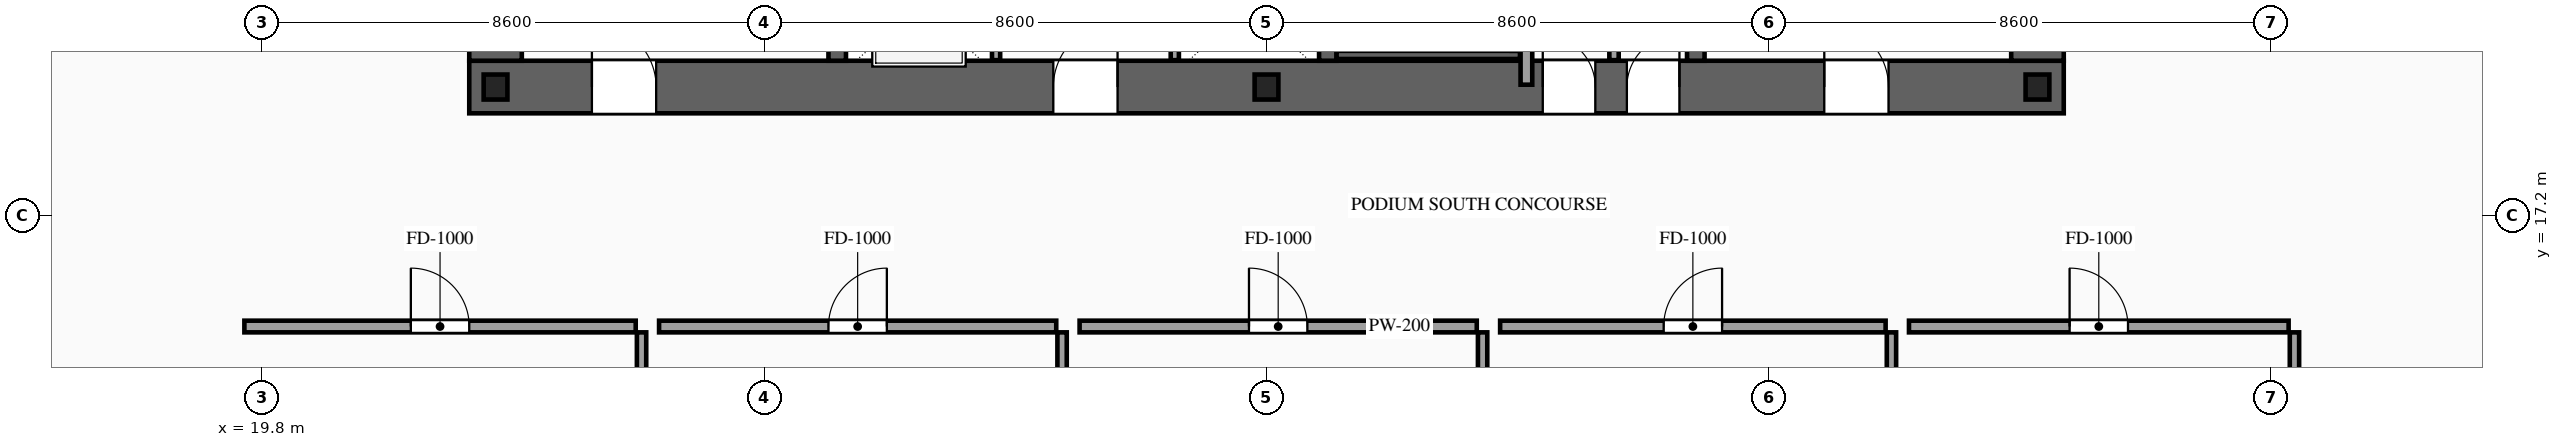
"""IFC4 building model, lengths in metres.
Left out: names, types, materials, properties, quantities, classifications, styles, units other than length and angle.
Written with IfcOpenShell. Run it as: python <this file> out.ifc"""

import sys

from ifc_helpers import new_model, si_unit, direction, frame, frame_2d, origin, origin_2d, place, context, subcontext, project, spatial, rectangle, i_section, extrude, source, transform, mapped, element, fill, save


model = new_model("IFC4")
c1 = context("Model", 3, precision=1e-05, world=origin(), true_north=direction((0.0, 1.0)))
c2 = subcontext(c1, "Body", "Model", "MODEL_VIEW")
j1 = project(units=[si_unit("LENGTHUNIT", "METRE"), si_unit("PLANEANGLEUNIT", "RADIAN")], contexts=[c1])
p1 = place(None, origin())
s1 = spatial("IfcSite", under=j1, at=p1, CompositionType="ELEMENT")
p2 = place(p1, origin())
s2 = spatial("IfcBuilding", under=s1, at=p2, CompositionType="ELEMENT")
p3 = place(p2, frame((0.0, 0.0, 15.0)))
s3 = spatial("IfcBuildingStorey", under=s2, at=p3, CompositionType="ELEMENT", Elevation=15.0)
p4 = place(p3, frame((23.35, 19.4, 0.0), z_axis=(0.0, 0.0, 1.0), x_axis=(1.0, 0.0, 0.0)))
e1 = element("IfcWall", 1, at=p4, inside=s3, PredefinedType="SHEAR", context=c2, shape_type="SweptSolid", body=[
    extrude(rectangle(XDim=27.3, YDim=0.9, at=frame_2d((13.65, 0.0))), origin(), (0.0, 0.0, 1.0), 4.8),
])
p5 = place(p4, frame((2.1, 0.0, 0.0)))
e2 = element("IfcOpeningElement", 2, at=p5, cuts=e1, PredefinedType="OPENING", context=c2, shape_type="SweptSolid", body=[
    extrude(rectangle(XDim=1.1, YDim=2.2, at=frame_2d((0.55, 1.1))), frame((0.0, 0.465, 0.0), z_axis=(0.0, -1.0, 0.0), x_axis=(1.0, 0.0, 0.0)), (0.0, 0.0, 1.0), 0.93),
])
p6 = place(p4, frame((10.0, 0.0, 0.0)))
e3 = element("IfcOpeningElement", 3, at=p6, cuts=e1, PredefinedType="OPENING", context=c2, shape_type="SweptSolid", body=[
    extrude(rectangle(XDim=1.1, YDim=2.2, at=frame_2d((0.55, 1.1))), frame((0.0, 0.465, 0.0), z_axis=(0.0, -1.0, 0.0), x_axis=(1.0, 0.0, 0.0)), (0.0, 0.0, 1.0), 0.93),
])
p7 = place(p4, frame((23.2, 0.0, 0.0)))
e4 = element("IfcOpeningElement", 4, at=p7, cuts=e1, PredefinedType="OPENING", context=c2, shape_type="SweptSolid", body=[
    extrude(rectangle(XDim=1.1, YDim=2.2, at=frame_2d((0.55, 1.1))), frame((0.0, 0.465, 0.0), z_axis=(0.0, -1.0, 0.0), x_axis=(1.0, 0.0, 0.0)), (0.0, 0.0, 1.0), 0.93),
])
p8 = place(p4, frame((19.82, 0.0, 0.0)))
e5 = element("IfcOpeningElement", 5, at=p8, cuts=e1, PredefinedType="OPENING", context=c2, shape_type="SweptSolid", body=[
    extrude(rectangle(XDim=0.9, YDim=2.15, at=frame_2d((0.45, 1.075))), frame((0.0, 0.465, 0.0), z_axis=(0.0, -1.0, 0.0), x_axis=(1.0, 0.0, 0.0)), (0.0, 0.0, 1.0), 0.93),
])
p9 = place(p4, frame((18.38, 0.0, 0.0)))
e6 = element("IfcOpeningElement", 6, at=p9, cuts=e1, PredefinedType="OPENING", context=c2, shape_type="SweptSolid", body=[
    extrude(rectangle(XDim=0.9, YDim=2.15, at=frame_2d((0.45, 1.075))), frame((0.0, 0.465, 0.0), z_axis=(0.0, -1.0, 0.0), x_axis=(1.0, 0.0, 0.0)), (0.0, 0.0, 1.0), 0.93),
])
m1 = source(origin(), c2, "Body", "SweptSolid", [
    extrude(rectangle(XDim=11.9, YDim=0.9, at=frame_2d((5.95, 0.0))), origin(), (0.0, 0.0, 1.0), 4.8),
])
for number, where, z_axis, x_axis in (
    (7, (23.8, 19.85, 0.0), (0.0, 0.0, 1.0), (0.0, 1.0, 0.0)),
    (8, (50.2, 19.85, 0.0), (0.0, 0.0, 1.0), (0.0, 1.0, 0.0)),
):
    element("IfcWall", number, at=place(p3, frame(where, z_axis=z_axis, x_axis=x_axis)), inside=s3, PredefinedType="SHEAR", context=c2, shape_type="MappedRepresentation", body=[
        mapped(m1, transform((0.0, 0.0, 0.0), scale=1.0)),
    ])
m2 = source(origin(), c2, "Body", "SweptSolid", [
    extrude(rectangle(XDim=11.9, YDim=0.3, at=frame_2d((5.95, 0.0))), origin(), (0.0, 0.0, 1.0), 4.8),
])
for number, where, z_axis, x_axis in (
    (9, (29.65, 19.85, 0.0), (0.0, 0.0, 1.0), (0.0, 1.0, 0.0)),
    (10, (38.05, 19.85, 0.0), (0.0, 0.0, 1.0), (0.0, 1.0, 0.0)),
    (11, (44.35, 19.85, 0.0), (0.0, 0.0, 1.0), (0.0, 1.0, 0.0)),
):
    element("IfcWall", number, at=place(p3, frame(where, z_axis=z_axis, x_axis=x_axis)), inside=s3, PredefinedType="SOLIDWALL", context=c2, shape_type="MappedRepresentation", body=[
        mapped(m2, transform((0.0, 0.0, 0.0), scale=1.0)),
    ])
m3 = source(origin(), c2, "Body", "SweptSolid", [
    extrude(i_section(OverallWidth=0.407, OverallDepth=0.428, WebThickness=0.02, FlangeThickness=0.035, at=origin_2d()), origin(), (0.0, 0.0, 1.0), 4.8),
])
for number, where, z_axis, x_axis in (
    (12, (23.8, 19.4, 0.0), (0.0, 0.0, 1.0), (1.0, 0.0, 0.0)),
    (13, (37.0, 19.4, 0.0), (0.0, 0.0, 1.0), (1.0, 0.0, 0.0)),
    (14, (50.2, 19.4, 0.0), (0.0, 0.0, 1.0), (1.0, 0.0, 0.0)),
):
    element("IfcColumn", number, at=place(p3, frame(where, z_axis=z_axis, x_axis=x_axis)), inside=s3, PredefinedType="COLUMN", context=c2, shape_type="MappedRepresentation", body=[
        mapped(m3, transform((0.0, 0.0, 0.0), scale=1.0)),
    ])
p10 = place(p3, frame((32.37, 19.86, 0.0), z_axis=(0.0, 0.0, 1.0), x_axis=(0.0, 1.0, 0.0)))
e15 = element("IfcWall", 15, at=p10, inside=s3, PredefinedType="SOLIDWALL", context=c2, shape_type="SweptSolid", body=[
    extrude(rectangle(XDim=2.04, YDim=0.14, at=frame_2d((1.02, 0.0))), origin(), (0.0, 0.0, 1.0), 4.52),
])
p11 = place(p10, frame((0.47, 0.0, 0.0)))
e16 = element("IfcOpeningElement", 16, at=p11, cuts=e15, PredefinedType="OPENING", context=c2, shape_type="SweptSolid", body=[
    extrude(rectangle(XDim=1.1, YDim=2.2, at=frame_2d((0.55, 1.1))), frame((0.0, 0.085, 0.0), z_axis=(0.0, -1.0, 0.0), x_axis=(1.0, 0.0, 0.0)), (0.0, 0.0, 1.0), 0.17),
])
m4 = source(origin(), c2, "Body", "SweptSolid", [
    extrude(rectangle(XDim=2.04, YDim=0.14, at=frame_2d((1.02, 0.0))), origin(), (0.0, 0.0, 1.0), 4.52),
])
p12 = place(p3, frame((35.43, 19.86, 0.0), z_axis=(0.0, 0.0, 1.0), x_axis=(0.0, 1.0, 0.0)))
e17 = element("IfcWall", 17, at=p12, inside=s3, PredefinedType="SOLIDWALL", context=c2, shape_type="MappedRepresentation", body=[
    mapped(m4, transform((0.0, 0.0, 0.0), scale=1.0)),
])
m5 = source(origin(), c2, "Body", "SweptSolid", [
    extrude(rectangle(XDim=3.14, YDim=0.14, at=frame_2d((1.57, 0.0))), origin(), (0.0, 0.0, 1.0), 4.52),
])
p13 = place(p3, frame((38.2, 19.95, 0.0), z_axis=(0.0, 0.0, 1.0), x_axis=(1.0, 0.0, 0.0)))
e18 = element("IfcWall", 18, at=p13, inside=s3, PredefinedType="SOLIDWALL", context=c2, shape_type="MappedRepresentation", body=[
    mapped(m5, transform((0.0, 0.0, 0.0), scale=1.0)),
])
m6 = source(origin(), c2, "Body", "SweptSolid", [
    extrude(rectangle(XDim=1.34, YDim=0.16, at=frame_2d((0.67, 0.0))), origin(), (0.0, 0.0, 1.0), 4.52),
])
p14 = place(p3, frame((42.95, 19.86, 0.0), z_axis=(0.0, 0.0, 1.0), x_axis=(0.0, 1.0, 0.0)))
e19 = element("IfcWall", 19, at=p14, inside=s3, PredefinedType="PARTITIONING", context=c2, shape_type="MappedRepresentation", body=[
    mapped(m6, transform((0.0, 0.0, 0.0), scale=1.0)),
])
m7 = source(origin(), c2, "Body", "SweptSolid", [
    extrude(rectangle(XDim=6.51, YDim=0.2, at=frame_2d((3.255, 0.0))), origin(), (0.0, 0.0, 1.0), 4.52),
])
p15 = place(p3, frame((41.45, 19.44, 0.0), z_axis=(0.0, 0.0, 1.0), x_axis=(0.0, 1.0, 0.0)))
e20 = element("IfcWall", 20, at=p15, inside=s3, PredefinedType="PARTITIONING", context=c2, shape_type="MappedRepresentation", body=[
    mapped(m7, transform((0.0, 0.0, 0.0), scale=1.0)),
])
p16 = place(p3, frame((19.5, 15.3, 0.0), z_axis=(0.0, 0.0, 1.0), x_axis=(1.0, 0.0, 0.0)))
e21 = element("IfcWall", 21, at=p16, inside=s3, PredefinedType="PARTITIONING", context=c2, shape_type="SweptSolid", body=[
    extrude(rectangle(XDim=6.7, YDim=0.2, at=frame_2d((3.35, 0.0))), origin(), (0.0, 0.0, 1.0), 4.52),
])
p17 = place(p16, frame((2.85, 0.0, 0.0)))
e22 = element("IfcOpeningElement", 22, at=p17, cuts=e21, PredefinedType="OPENING", context=c2, shape_type="SweptSolid", body=[
    extrude(rectangle(XDim=1.0, YDim=2.2, at=frame_2d((0.5, 1.1))), frame((0.0, 0.115, 0.0), z_axis=(0.0, -1.0, 0.0), x_axis=(1.0, 0.0, 0.0)), (0.0, 0.0, 1.0), 0.23),
])
m8 = source(origin(), c2, "Body", "SweptSolid", [
    extrude(rectangle(XDim=13.22, YDim=0.16, at=frame_2d((6.61, 0.0))), origin(), (0.0, 0.0, 1.0), 4.52),
])
p18 = place(p3, frame((26.3, 1.98, 0.0), z_axis=(0.0, 0.0, 1.0), x_axis=(0.0, 1.0, 0.0)))
e23 = element("IfcWall", 23, at=p18, inside=s3, PredefinedType="PARTITIONING", context=c2, shape_type="MappedRepresentation", body=[
    mapped(m8, transform((0.0, 0.0, 0.0), scale=1.0)),
])
p19 = place(p3, frame((26.6, 15.3, 0.0), z_axis=(0.0, 0.0, 1.0), x_axis=(1.0, 0.0, 0.0)))
e24 = element("IfcWall", 24, at=p19, inside=s3, PredefinedType="PARTITIONING", context=c2, shape_type="SweptSolid", body=[
    extrude(rectangle(XDim=6.8, YDim=0.2, at=frame_2d((3.4, 0.0))), origin(), (0.0, 0.0, 1.0), 4.52),
])
p20 = place(p19, frame((2.9, 0.0, 0.0)))
e25 = element("IfcOpeningElement", 25, at=p20, cuts=e24, PredefinedType="OPENING", context=c2, shape_type="SweptSolid", body=[
    extrude(rectangle(XDim=1.0, YDim=2.2, at=frame_2d((0.5, 1.1))), frame((0.0, 0.115, 0.0), z_axis=(0.0, -1.0, 0.0), x_axis=(1.0, 0.0, 0.0)), (0.0, 0.0, 1.0), 0.23),
])
p21 = place(p3, frame((33.5, 1.98, 0.0), z_axis=(0.0, 0.0, 1.0), x_axis=(0.0, 1.0, 0.0)))
e26 = element("IfcWall", 26, at=p21, inside=s3, PredefinedType="PARTITIONING", context=c2, shape_type="MappedRepresentation", body=[
    mapped(m8, transform((0.0, 0.0, 0.0), scale=1.0)),
])
p22 = place(p3, frame((33.8, 15.3, 0.0), z_axis=(0.0, 0.0, 1.0), x_axis=(1.0, 0.0, 0.0)))
e27 = element("IfcWall", 27, at=p22, inside=s3, PredefinedType="PARTITIONING", context=c2, shape_type="SweptSolid", body=[
    extrude(rectangle(XDim=6.8, YDim=0.2, at=frame_2d((3.4, 0.0))), origin(), (0.0, 0.0, 1.0), 4.52),
])
p23 = place(p22, frame((2.9, 0.0, 0.0)))
e28 = element("IfcOpeningElement", 28, at=p23, cuts=e27, PredefinedType="OPENING", context=c2, shape_type="SweptSolid", body=[
    extrude(rectangle(XDim=1.0, YDim=2.2, at=frame_2d((0.5, 1.1))), frame((0.0, 0.115, 0.0), z_axis=(0.0, -1.0, 0.0), x_axis=(1.0, 0.0, 0.0)), (0.0, 0.0, 1.0), 0.23),
])
p24 = place(p3, frame((40.7, 1.98, 0.0), z_axis=(0.0, 0.0, 1.0), x_axis=(0.0, 1.0, 0.0)))
e29 = element("IfcWall", 29, at=p24, inside=s3, PredefinedType="PARTITIONING", context=c2, shape_type="MappedRepresentation", body=[
    mapped(m8, transform((0.0, 0.0, 0.0), scale=1.0)),
])
p25 = place(p3, frame((41.0, 15.3, 0.0), z_axis=(0.0, 0.0, 1.0), x_axis=(1.0, 0.0, 0.0)))
e30 = element("IfcWall", 30, at=p25, inside=s3, PredefinedType="PARTITIONING", context=c2, shape_type="SweptSolid", body=[
    extrude(rectangle(XDim=6.6, YDim=0.2, at=frame_2d((3.3, 0.0))), origin(), (0.0, 0.0, 1.0), 4.52),
])
p26 = place(p25, frame((2.8, 0.0, 0.0)))
e31 = element("IfcOpeningElement", 31, at=p26, cuts=e30, PredefinedType="OPENING", context=c2, shape_type="SweptSolid", body=[
    extrude(rectangle(XDim=1.0, YDim=2.2, at=frame_2d((0.5, 1.1))), frame((0.0, 0.115, 0.0), z_axis=(0.0, -1.0, 0.0), x_axis=(1.0, 0.0, 0.0)), (0.0, 0.0, 1.0), 0.23),
])
p27 = place(p3, frame((47.7, 1.98, 0.0), z_axis=(0.0, 0.0, 1.0), x_axis=(0.0, 1.0, 0.0)))
e32 = element("IfcWall", 32, at=p27, inside=s3, PredefinedType="PARTITIONING", context=c2, shape_type="MappedRepresentation", body=[
    mapped(m8, transform((0.0, 0.0, 0.0), scale=1.0)),
])
p28 = place(p3, frame((48.0, 15.3, 0.0), z_axis=(0.0, 0.0, 1.0), x_axis=(1.0, 0.0, 0.0)))
e33 = element("IfcWall", 33, at=p28, inside=s3, PredefinedType="PARTITIONING", context=c2, shape_type="SweptSolid", body=[
    extrude(rectangle(XDim=6.5, YDim=0.2, at=frame_2d((3.25, 0.0))), origin(), (0.0, 0.0, 1.0), 4.52),
])
p29 = place(p28, frame((2.75, 0.0, 0.0)))
e34 = element("IfcOpeningElement", 34, at=p29, cuts=e33, PredefinedType="OPENING", context=c2, shape_type="SweptSolid", body=[
    extrude(rectangle(XDim=1.0, YDim=2.2, at=frame_2d((0.5, 1.1))), frame((0.0, 0.115, 0.0), z_axis=(0.0, -1.0, 0.0), x_axis=(1.0, 0.0, 0.0)), (0.0, 0.0, 1.0), 0.23),
])
p30 = place(p3, frame((54.6, 1.98, 0.0), z_axis=(0.0, 0.0, 1.0), x_axis=(0.0, 1.0, 0.0)))
e35 = element("IfcWall", 35, at=p30, inside=s3, PredefinedType="PARTITIONING", context=c2, shape_type="MappedRepresentation", body=[
    mapped(m8, transform((0.0, 0.0, 0.0), scale=1.0)),
])
m9 = source(origin(), c2, "Body", "SweptSolid", [
    extrude(rectangle(XDim=1.1, YDim=2.2, at=frame_2d((0.55, 1.1))), frame((0.0, 0.025, 0.0), z_axis=(0.0, -1.0, 0.0), x_axis=(1.0, 0.0, 0.0)), (0.0, 0.0, 1.0), 0.05),
])
p31 = place(p5, origin())
e36 = element("IfcDoor", 36, at=p31, inside=s3, OperationType="SINGLE_SWING_LEFT", PredefinedType="DOOR", context=c2, shape_type="MappedRepresentation", body=[
    mapped(m9, transform((0.0, 0.0, 0.0), scale=1.0)),
])
fill(e2, e36)
p32 = place(p6, origin())
e37 = element("IfcDoor", 37, at=p32, inside=s3, OperationType="SINGLE_SWING_RIGHT", PredefinedType="DOOR", context=c2, shape_type="MappedRepresentation", body=[
    mapped(m9, transform((0.0, 0.0, 0.0), scale=1.0)),
])
fill(e3, e37)
p33 = place(p7, origin())
e38 = element("IfcDoor", 38, at=p33, inside=s3, OperationType="SINGLE_SWING_LEFT", PredefinedType="DOOR", context=c2, shape_type="MappedRepresentation", body=[
    mapped(m9, transform((0.0, 0.0, 0.0), scale=1.0)),
])
fill(e4, e38)
m10 = source(origin(), c2, "Body", "SweptSolid", [
    extrude(rectangle(XDim=0.9, YDim=2.15, at=frame_2d((0.45, 1.075))), frame((0.0, 0.025, 0.0), z_axis=(0.0, -1.0, 0.0), x_axis=(1.0, 0.0, 0.0)), (0.0, 0.0, 1.0), 0.05),
])
p34 = place(p8, origin())
e39 = element("IfcDoor", 39, at=p34, inside=s3, OperationType="SINGLE_SWING_RIGHT", PredefinedType="DOOR", context=c2, shape_type="MappedRepresentation", body=[
    mapped(m10, transform((0.0, 0.0, 0.0), scale=1.0)),
])
fill(e5, e39)
p35 = place(p9, origin())
e40 = element("IfcDoor", 40, at=p35, inside=s3, OperationType="SINGLE_SWING_LEFT", PredefinedType="DOOR", context=c2, shape_type="MappedRepresentation", body=[
    mapped(m10, transform((0.0, 0.0, 0.0), scale=1.0)),
])
fill(e6, e40)
m11 = source(origin(), c2, "Body", "SweptSolid", [
    extrude(rectangle(XDim=1.0, YDim=2.2, at=frame_2d((0.5, 1.1))), frame((0.0, 0.025, 0.0), z_axis=(0.0, -1.0, 0.0), x_axis=(1.0, 0.0, 0.0)), (0.0, 0.0, 1.0), 0.05),
])
p36 = place(p17, origin())
e41 = element("IfcDoor", 41, at=p36, inside=s3, OperationType="SINGLE_SWING_LEFT", PredefinedType="DOOR", context=c2, shape_type="MappedRepresentation", body=[
    mapped(m11, transform((0.0, 0.0, 0.0), scale=1.0)),
])
fill(e22, e41)
p37 = place(p20, origin())
e42 = element("IfcDoor", 42, at=p37, inside=s3, OperationType="SINGLE_SWING_RIGHT", PredefinedType="DOOR", context=c2, shape_type="MappedRepresentation", body=[
    mapped(m11, transform((0.0, 0.0, 0.0), scale=1.0)),
])
fill(e25, e42)
p38 = place(p23, origin())
e43 = element("IfcDoor", 43, at=p38, inside=s3, OperationType="SINGLE_SWING_LEFT", PredefinedType="DOOR", context=c2, shape_type="MappedRepresentation", body=[
    mapped(m11, transform((0.0, 0.0, 0.0), scale=1.0)),
])
fill(e28, e43)
p39 = place(p26, origin())
e44 = element("IfcDoor", 44, at=p39, inside=s3, OperationType="SINGLE_SWING_RIGHT", PredefinedType="DOOR", context=c2, shape_type="MappedRepresentation", body=[
    mapped(m11, transform((0.0, 0.0, 0.0), scale=1.0)),
])
fill(e31, e44)
p40 = place(p29, origin())
e45 = element("IfcDoor", 45, at=p40, inside=s3, OperationType="SINGLE_SWING_LEFT", PredefinedType="DOOR", context=c2, shape_type="MappedRepresentation", body=[
    mapped(m11, transform((0.0, 0.0, 0.0), scale=1.0)),
])
fill(e34, e45)
save(model, sys.argv[1])
